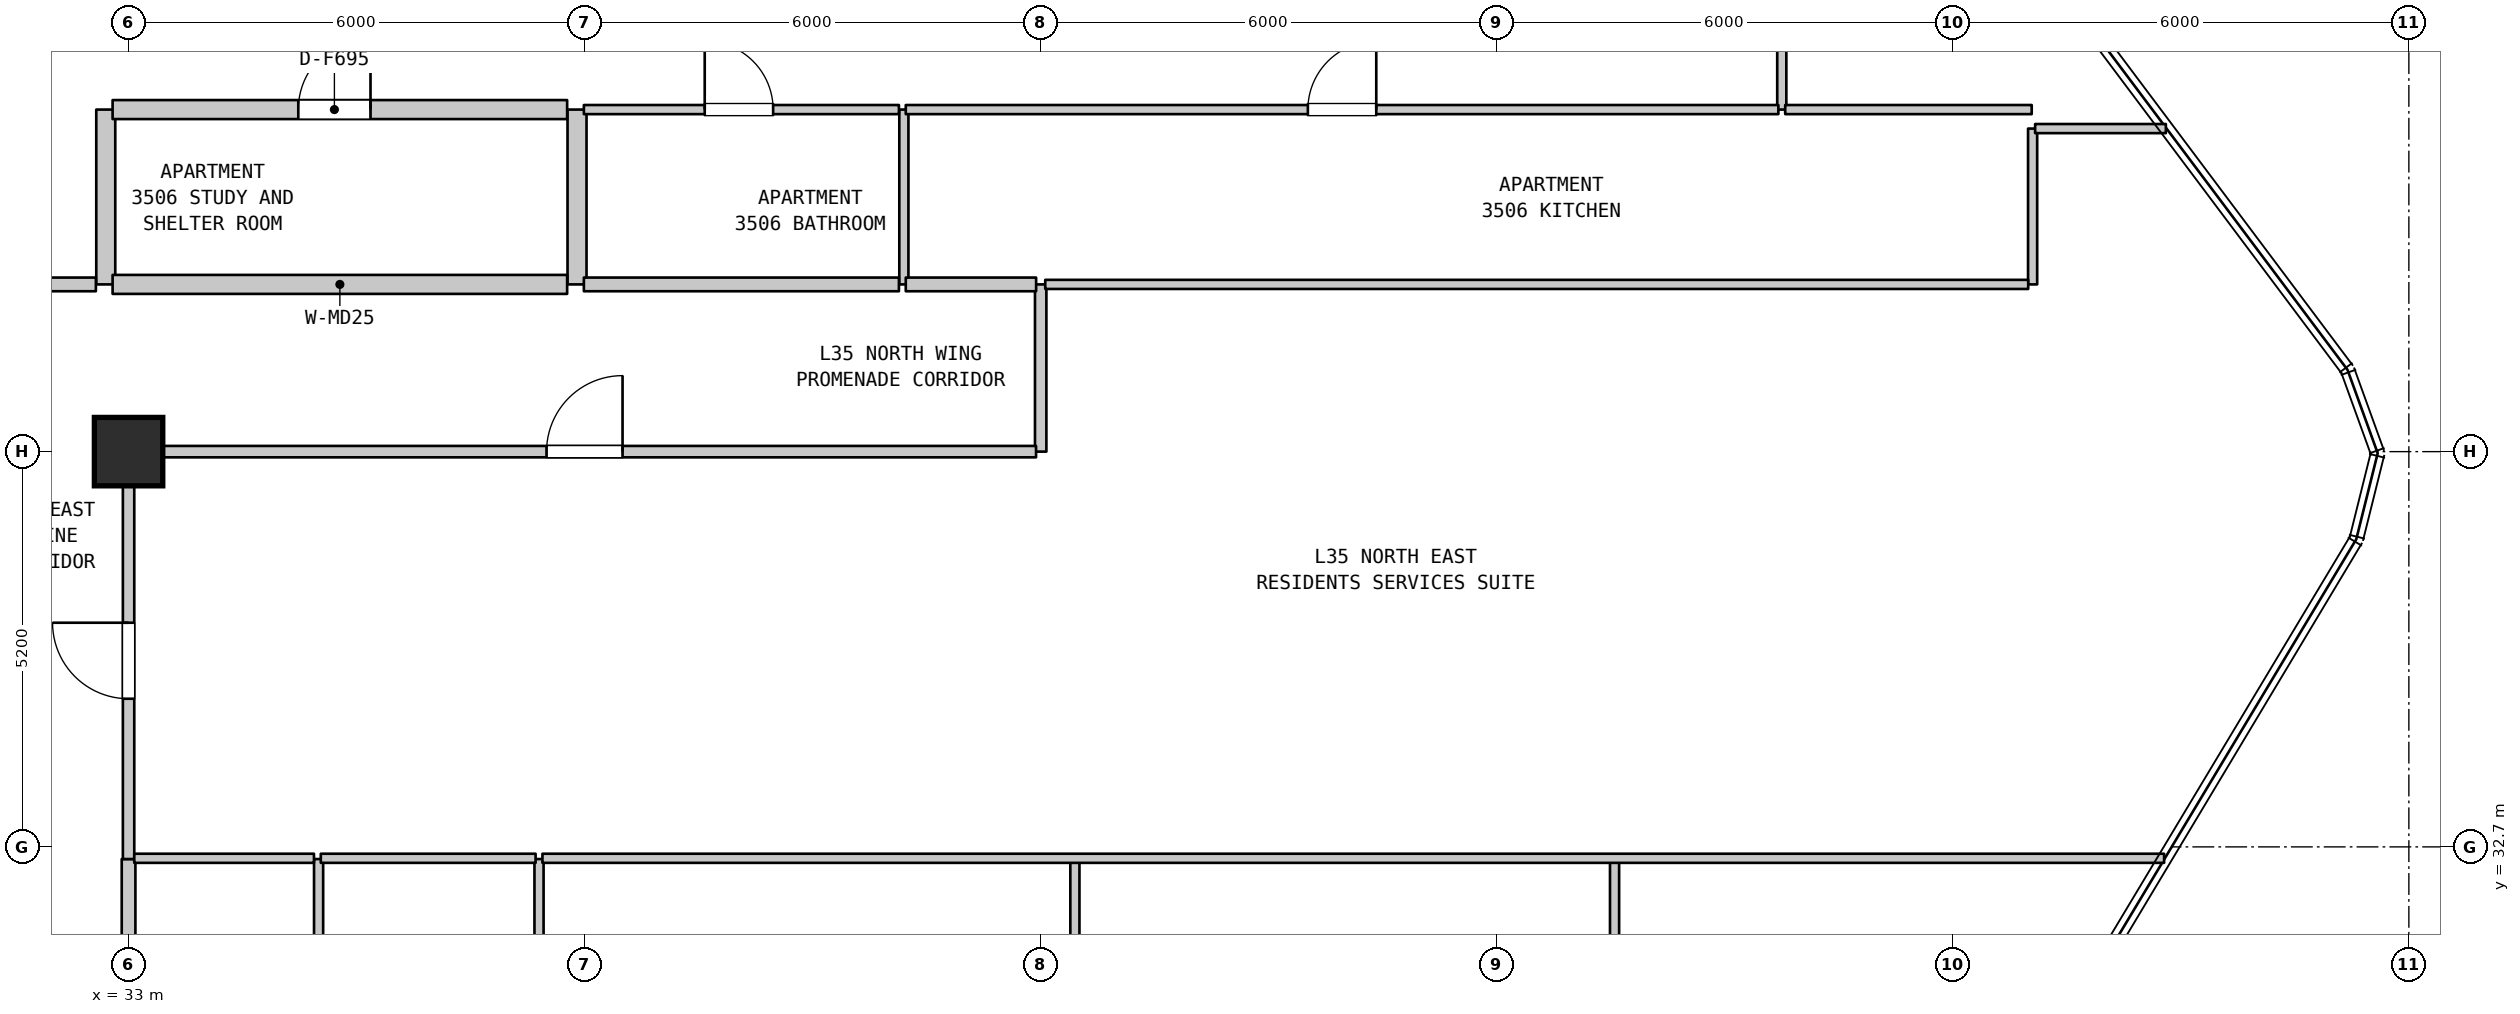
"""IFC4 building model, lengths in metres.
Left out: names, types, materials, properties, quantities, classifications, styles, units other than length and angle.
Written with IfcOpenShell. Run it as: python <this file> out.ifc"""

import sys

from ifc_helpers import new_model, si_unit, direction, frame, frame_2d, origin, origin_2d, place, context, subcontext, project, spatial, rectangle, extrude, element, fill, save


model = new_model("IFC4")
c1 = context("Model", 3, precision=1e-05, world=origin(), true_north=direction((0.0, 1.0)))
c2 = subcontext(c1, "Body", "Model", "MODEL_VIEW")
j1 = project(units=[si_unit("LENGTHUNIT", "METRE"), si_unit("PLANEANGLEUNIT", "RADIAN")], contexts=[c1])
p1 = place(None, origin())
s1 = spatial("IfcSite", under=j1, at=p1, CompositionType="ELEMENT")
p2 = place(p1, origin())
s2 = spatial("IfcBuilding", under=s1, at=p2, CompositionType="ELEMENT")
p3 = place(p2, frame((0.0, 0.0, 144.6)))
s3 = spatial("IfcBuildingStorey", under=s2, at=p3, CompositionType="ELEMENT", Elevation=144.6)
p4 = place(p3, frame((33.0, 37.9, 0.0), z_axis=(0.0, 0.0, 1.0), x_axis=(1.0, 0.0, 0.0)))
e1 = element("IfcColumn", 1, at=p4, inside=s3, PredefinedType="COLUMN", context=c2, shape_type="SweptSolid", body=[
    extrude(rectangle(XDim=0.9, YDim=0.9, at=origin_2d()), origin(), (0.0, 0.0, 1.0), 3.7),
])
p5 = place(p3, frame((32.7, 40.1, 0.0), z_axis=(0.0, 0.0, 1.0), x_axis=(0.0, 1.0, 0.0)))
e2 = element("IfcWall", 2, at=p5, inside=s3, PredefinedType="STANDARD", context=c2, shape_type="SweptSolid", body=[
    extrude(rectangle(XDim=2.3, YDim=0.25, at=frame_2d((1.15, 0.0))), origin(), (0.0, 0.0, 1.0), 3.385),
])
p6 = place(p3, frame((33.0, 27.47, 0.0), z_axis=(0.0, 0.0, 1.0), x_axis=(0.0, 1.0, 0.0)))
e3 = element("IfcWall", 3, at=p6, inside=s3, PredefinedType="STANDARD", context=c2, shape_type="SweptSolid", body=[
    extrude(rectangle(XDim=5.07, YDim=0.18, at=frame_2d((2.535, 0.0))), origin(), (0.0, 0.0, 1.0), 2.885),
])
p7 = place(p3, frame((33.0, 32.54, 0.0), z_axis=(0.0, 0.0, 1.0), x_axis=(0.0, 1.0, 0.0)))
e4 = element("IfcWall", 4, at=p7, inside=s3, PredefinedType="STANDARD", context=c2, shape_type="SweptSolid", body=[
    extrude(rectangle(XDim=5.36, YDim=0.15, at=frame_2d((2.68, 0.0))), origin(), (0.0, 0.0, 1.0), 2.885),
])
p8 = place(p7, frame((2.109, 0.0, 0.0)))
e5 = element("IfcOpeningElement", 5, at=p8, cuts=e4, PredefinedType="OPENING", context=c2, shape_type="SweptSolid", body=[
    extrude(rectangle(XDim=1.0, YDim=2.15, at=frame_2d((0.5, 1.075))), frame((0.0, 0.085, 0.0), z_axis=(0.0, -1.0, 0.0), x_axis=(1.0, 0.0, 0.0)), (0.0, 0.0, 1.0), 0.17),
])
for number, where, z_axis, x_axis in (
    (6, (35.5, 27.47, 0.0), (0.0, 0.0, 1.0), (0.0, 1.0, 0.0)),
    (7, (38.4, 27.47, 0.0), (0.0, 0.0, 1.0), (0.0, 1.0, 0.0)),
):
    element("IfcWall", number, at=place(p3, frame(where, z_axis=z_axis, x_axis=x_axis)), inside=s3, PredefinedType="PARTITIONING", context=c2, shape_type="SweptSolid", body=[
        extrude(rectangle(XDim=5.07, YDim=0.12, at=frame_2d((2.535, 0.0))), origin(), (0.0, 0.0, 1.0), 3.385),
    ])
p9 = place(p3, frame((38.9, 40.1, 0.0), z_axis=(0.0, 0.0, 1.0), x_axis=(0.0, 1.0, 0.0)))
e8 = element("IfcWall", 8, at=p9, inside=s3, PredefinedType="STANDARD", context=c2, shape_type="SweptSolid", body=[
    extrude(rectangle(XDim=2.3, YDim=0.25, at=frame_2d((1.15, 0.0))), origin(), (0.0, 0.0, 1.0), 3.385),
])
p10 = place(p3, frame((43.2, 40.1, 0.0), z_axis=(0.0, 0.0, 1.0), x_axis=(0.0, 1.0, 0.0)))
e9 = element("IfcWall", 9, at=p10, inside=s3, PredefinedType="PARTITIONING", context=c2, shape_type="SweptSolid", body=[
    extrude(rectangle(XDim=2.3, YDim=0.12, at=frame_2d((1.15, 0.0))), origin(), (0.0, 0.0, 1.0), 3.385),
])
p11 = place(p3, frame((45.0, 37.9, 0.0), z_axis=(0.0, 0.0, 1.0), x_axis=(0.0, 1.0, 0.0)))
e10 = element("IfcWall", 10, at=p11, inside=s3, PredefinedType="STANDARD", context=c2, shape_type="SweptSolid", body=[
    extrude(rectangle(XDim=2.2, YDim=0.15, at=frame_2d((1.1, 0.0))), origin(), (0.0, 0.0, 1.0), 3.385),
])
for number, where, z_axis, x_axis in (
    (11, (45.45, 27.47, 0.0), (0.0, 0.0, 1.0), (0.0, 1.0, 0.0)),
    (12, (52.55, 27.47, 0.0), (0.0, 0.0, 1.0), (0.0, 1.0, 0.0)),
):
    element("IfcWall", number, at=place(p3, frame(where, z_axis=z_axis, x_axis=x_axis)), inside=s3, PredefinedType="PARTITIONING", context=c2, shape_type="SweptSolid", body=[
        extrude(rectangle(XDim=5.07, YDim=0.12, at=frame_2d((2.535, 0.0))), origin(), (0.0, 0.0, 1.0), 3.385),
    ])
p12 = place(p3, frame((54.75, 42.4, 0.0), z_axis=(0.0, 0.0, 1.0), x_axis=(0.0, 1.0, 0.0)))
e13 = element("IfcWall", 13, at=p12, inside=s3, PredefinedType="PARTITIONING", context=c2, shape_type="SweptSolid", body=[
    extrude(rectangle(XDim=3.05, YDim=0.12, at=frame_2d((1.525, 0.0))), origin(), (0.0, 0.0, 1.0), 3.385),
])
p13 = place(p12, frame((1.003, 0.0, 0.0)))
e14 = element("IfcOpeningElement", 14, at=p13, cuts=e13, PredefinedType="OPENING", context=c2, shape_type="SweptSolid", body=[
    extrude(rectangle(XDim=0.9, YDim=2.15, at=frame_2d((0.45, 1.075))), frame((0.0, 0.07, 0.0), z_axis=(0.0, -1.0, 0.0), x_axis=(1.0, 0.0, 0.0)), (0.0, 0.0, 1.0), 0.14),
])
p14 = place(p3, frame((58.05, 40.1, 0.0), z_axis=(0.0, 0.0, 1.0), x_axis=(0.0, 1.0, 0.0)))
e15 = element("IfcWall", 15, at=p14, inside=s3, PredefinedType="PARTITIONING", context=c2, shape_type="SweptSolid", body=[
    extrude(rectangle(XDim=2.05, YDim=0.12, at=frame_2d((1.025, 0.0))), origin(), (0.0, 0.0, 1.0), 3.385),
])
p15 = place(p3, frame((33.075, 32.55, 0.0), z_axis=(0.0, 0.0, 1.0), x_axis=(1.0, 0.0, 0.0)))
e16 = element("IfcWall", 16, at=p15, inside=s3, PredefinedType="PARTITIONING", context=c2, shape_type="SweptSolid", body=[
    extrude(rectangle(XDim=2.364, YDim=0.12, at=frame_2d((1.182, 0.0))), origin(), (0.0, 0.0, 1.0), 3.385),
])
p16 = place(p3, frame((35.529, 32.55, 0.0), z_axis=(0.0, 0.0, 1.0), x_axis=(1.0, 0.0, 0.0)))
e17 = element("IfcWall", 17, at=p16, inside=s3, PredefinedType="PARTITIONING", context=c2, shape_type="SweptSolid", body=[
    extrude(rectangle(XDim=2.826, YDim=0.12, at=frame_2d((1.413, 0.0))), origin(), (0.0, 0.0, 1.0), 3.385),
])
p17 = place(p3, frame((38.445, 32.55, 0.0), z_axis=(0.0, 0.0, 1.0), x_axis=(1.0, 0.0, 0.0)))
e18 = element("IfcWall", 18, at=p17, inside=s3, PredefinedType="PARTITIONING", context=c2, shape_type="SweptSolid", body=[
    extrude(rectangle(XDim=21.335, YDim=0.12, at=frame_2d((10.667, 0.0))), origin(), (0.0, 0.0, 1.0), 3.385),
])
p18 = place(p3, frame((33.06, 37.9, 0.0), z_axis=(0.0, 0.0, 1.0), x_axis=(1.0, 0.0, 0.0)))
e19 = element("IfcWall", 19, at=p18, inside=s3, PredefinedType="STANDARD", context=c2, shape_type="SweptSolid", body=[
    extrude(rectangle(XDim=11.879, YDim=0.15, at=frame_2d((5.939, 0.0))), origin(), (0.0, 0.0, 1.0), 3.385),
])
p19 = place(p18, frame((5.439, 0.0, 0.0)))
e20 = element("IfcOpeningElement", 20, at=p19, cuts=e19, PredefinedType="OPENING", context=c2, shape_type="SweptSolid", body=[
    extrude(rectangle(XDim=1.0, YDim=2.15, at=frame_2d((0.5, 1.075))), frame((0.0, 0.085, 0.0), z_axis=(0.0, -1.0, 0.0), x_axis=(1.0, 0.0, 0.0)), (0.0, 0.0, 1.0), 0.17),
])
p20 = place(p3, frame((22.225, 40.1, 0.0), z_axis=(0.0, 0.0, 1.0), x_axis=(1.0, 0.0, 0.0)))
e21 = element("IfcWall", 21, at=p20, inside=s3, PredefinedType="STANDARD", context=c2, shape_type="SweptSolid", body=[
    extrude(rectangle(XDim=10.345, YDim=0.18, at=frame_2d((5.172, 0.0))), origin(), (0.0, 0.0, 1.0), 3.385),
])
p21 = place(p20, frame((2.305, 0.0, 0.0)))
e22 = element("IfcOpeningElement", 22, at=p21, cuts=e21, PredefinedType="OPENING", context=c2, shape_type="SweptSolid", body=[
    extrude(rectangle(XDim=1.0, YDim=2.15, at=frame_2d((0.5, 1.075))), frame((0.0, 0.1, 0.0), z_axis=(0.0, -1.0, 0.0), x_axis=(1.0, 0.0, 0.0)), (0.0, 0.0, 1.0), 0.2),
])
p22 = place(p20, frame((7.235, 0.0, 0.0)))
e23 = element("IfcOpeningElement", 23, at=p22, cuts=e21, PredefinedType="OPENING", context=c2, shape_type="SweptSolid", body=[
    extrude(rectangle(XDim=1.0, YDim=2.15, at=frame_2d((0.5, 1.075))), frame((0.0, 0.1, 0.0), z_axis=(0.0, -1.0, 0.0), x_axis=(1.0, 0.0, 0.0)), (0.0, 0.0, 1.0), 0.2),
])
p23 = place(p3, frame((32.79, 40.1, 0.0), z_axis=(0.0, 0.0, 1.0), x_axis=(1.0, 0.0, 0.0)))
e24 = element("IfcWall", 24, at=p23, inside=s3, PredefinedType="STANDARD", context=c2, shape_type="SweptSolid", body=[
    extrude(rectangle(XDim=5.98, YDim=0.25, at=frame_2d((2.99, 0.0))), origin(), (0.0, 0.0, 1.0), 3.385),
])
p24 = place(p3, frame((38.99, 40.1, 0.0), z_axis=(0.0, 0.0, 1.0), x_axis=(1.0, 0.0, 0.0)))
e25 = element("IfcWall", 25, at=p24, inside=s3, PredefinedType="STANDARD", context=c2, shape_type="SweptSolid", body=[
    extrude(rectangle(XDim=4.145, YDim=0.18, at=frame_2d((2.073, 0.0))), origin(), (0.0, 0.0, 1.0), 3.385),
])
p25 = place(p3, frame((43.225, 40.1, 0.0), z_axis=(0.0, 0.0, 1.0), x_axis=(1.0, 0.0, 0.0)))
e26 = element("IfcWall", 26, at=p25, inside=s3, PredefinedType="STANDARD", context=c2, shape_type="SweptSolid", body=[
    extrude(rectangle(XDim=1.715, YDim=0.18, at=frame_2d((0.857, 0.0))), origin(), (0.0, 0.0, 1.0), 3.385),
])
p26 = place(p3, frame((45.06, 40.1, 0.0), z_axis=(0.0, 0.0, 1.0), x_axis=(1.0, 0.0, 0.0)))
e27 = element("IfcWall", 27, at=p26, inside=s3, PredefinedType="PARTITIONING", context=c2, shape_type="SweptSolid", body=[
    extrude(rectangle(XDim=12.932, YDim=0.12, at=frame_2d((6.466, 0.0))), origin(), (0.0, 0.0, 1.0), 3.385),
])
p27 = place(p3, frame((58.083, 42.15, 0.0), z_axis=(0.0, 0.0, 1.0), x_axis=(1.0, 0.0, 0.0)))
e28 = element("IfcWall", 28, at=p27, inside=s3, PredefinedType="PARTITIONING", context=c2, shape_type="SweptSolid", body=[
    extrude(rectangle(XDim=1.72, YDim=0.12, at=frame_2d((0.86, 0.0))), origin(), (0.0, 0.0, 1.0), 3.385),
])
p28 = place(p3, frame((32.79, 42.4, 0.0), z_axis=(0.0, 0.0, 1.0), x_axis=(1.0, 0.0, 0.0)))
e29 = element("IfcWall", 29, at=p28, inside=s3, PredefinedType="STANDARD", context=c2, shape_type="SweptSolid", body=[
    extrude(rectangle(XDim=5.98, YDim=0.25, at=frame_2d((2.99, 0.0))), origin(), (0.0, 0.0, 1.0), 3.385),
])
p29 = place(p28, frame((2.443, 0.0, 0.0)))
e30 = element("IfcOpeningElement", 30, at=p29, cuts=e29, PredefinedType="OPENING", context=c2, shape_type="SweptSolid", body=[
    extrude(rectangle(XDim=0.95, YDim=2.15, at=frame_2d((0.475, 1.075))), frame((0.0, 0.135, 0.0), z_axis=(0.0, -1.0, 0.0), x_axis=(1.0, 0.0, 0.0)), (0.0, 0.0, 1.0), 0.27),
])
p30 = place(p3, frame((38.99, 42.4, 0.0), z_axis=(0.0, 0.0, 1.0), x_axis=(1.0, 0.0, 0.0)))
e31 = element("IfcWall", 31, at=p30, inside=s3, PredefinedType="PARTITIONING", context=c2, shape_type="SweptSolid", body=[
    extrude(rectangle(XDim=4.145, YDim=0.12, at=frame_2d((2.073, 0.0))), origin(), (0.0, 0.0, 1.0), 3.385),
])
p31 = place(p30, frame((1.59, 0.0, 0.0)))
e32 = element("IfcOpeningElement", 32, at=p31, cuts=e31, PredefinedType="OPENING", context=c2, shape_type="SweptSolid", body=[
    extrude(rectangle(XDim=0.9, YDim=2.1, at=frame_2d((0.45, 1.05))), frame((0.0, 0.07, 0.0), z_axis=(0.0, -1.0, 0.0), x_axis=(1.0, 0.0, 0.0)), (0.0, 0.0, 1.0), 0.14),
])
p32 = place(p3, frame((43.225, 42.4, 0.0), z_axis=(0.0, 0.0, 1.0), x_axis=(1.0, 0.0, 0.0)))
e33 = element("IfcWall", 33, at=p32, inside=s3, PredefinedType="PARTITIONING", context=c2, shape_type="SweptSolid", body=[
    extrude(rectangle(XDim=11.48, YDim=0.12, at=frame_2d((5.74, 0.0))), origin(), (0.0, 0.0, 1.0), 3.385),
])
p33 = place(p32, frame((5.29, 0.0, 0.0)))
e34 = element("IfcOpeningElement", 34, at=p33, cuts=e33, PredefinedType="OPENING", context=c2, shape_type="SweptSolid", body=[
    extrude(rectangle(XDim=0.9, YDim=2.15, at=frame_2d((0.45, 1.075))), frame((0.0, 0.07, 0.0), z_axis=(0.0, -1.0, 0.0), x_axis=(1.0, 0.0, 0.0)), (0.0, 0.0, 1.0), 0.14),
])
p34 = place(p3, frame((54.795, 42.4, 0.0), z_axis=(0.0, 0.0, 1.0), x_axis=(1.0, 0.0, 0.0)))
e35 = element("IfcWall", 35, at=p34, inside=s3, PredefinedType="PARTITIONING", context=c2, shape_type="SweptSolid", body=[
    extrude(rectangle(XDim=3.243, YDim=0.12, at=frame_2d((1.622, 0.0))), origin(), (0.0, 0.0, 1.0), 3.385),
])
p35 = place(p8, origin())
e36 = element("IfcDoor", 36, at=p35, inside=s3, OperationType="SINGLE_SWING_RIGHT", PredefinedType="DOOR", context=c2, shape_type="SweptSolid", body=[
    extrude(rectangle(XDim=1.0, YDim=2.15, at=frame_2d((0.5, 1.075))), frame((0.0, 0.025, 0.0), z_axis=(0.0, -1.0, 0.0), x_axis=(1.0, 0.0, 0.0)), (0.0, 0.0, 1.0), 0.05),
])
fill(e5, e36)
p36 = place(p19, origin())
e37 = element("IfcDoor", 37, at=p36, inside=s3, OperationType="SINGLE_SWING_RIGHT", PredefinedType="DOOR", context=c2, shape_type="SweptSolid", body=[
    extrude(rectangle(XDim=1.0, YDim=2.15, at=frame_2d((0.5, 1.075))), frame((0.0, 0.025, 0.0), z_axis=(0.0, -1.0, 0.0), x_axis=(1.0, 0.0, 0.0)), (0.0, 0.0, 1.0), 0.05),
])
fill(e20, e37)
p37 = place(p29, origin())
e38 = element("IfcDoor", 38, at=p37, inside=s3, OperationType="SINGLE_SWING_RIGHT", PredefinedType="DOOR", context=c2, shape_type="SweptSolid", body=[
    extrude(rectangle(XDim=0.95, YDim=2.15, at=frame_2d((0.475, 1.075))), frame((0.0, 0.025, 0.0), z_axis=(0.0, -1.0, 0.0), x_axis=(1.0, 0.0, 0.0)), (0.0, 0.0, 1.0), 0.05),
])
fill(e30, e38)
p38 = place(p31, origin())
e39 = element("IfcDoor", 39, at=p38, inside=s3, OperationType="SINGLE_SWING_LEFT", PredefinedType="DOOR", context=c2, shape_type="SweptSolid", body=[
    extrude(rectangle(XDim=0.9, YDim=2.1, at=frame_2d((0.45, 1.05))), frame((0.0, 0.025, 0.0), z_axis=(0.0, -1.0, 0.0), x_axis=(1.0, 0.0, 0.0)), (0.0, 0.0, 1.0), 0.05),
])
fill(e32, e39)
p39 = place(p33, origin())
e40 = element("IfcDoor", 40, at=p39, inside=s3, OperationType="SINGLE_SWING_RIGHT", PredefinedType="DOOR", context=c2, shape_type="SweptSolid", body=[
    extrude(rectangle(XDim=0.9, YDim=2.15, at=frame_2d((0.45, 1.075))), frame((0.0, 0.025, 0.0), z_axis=(0.0, -1.0, 0.0), x_axis=(1.0, 0.0, 0.0)), (0.0, 0.0, 1.0), 0.05),
])
fill(e34, e40)
save(model, sys.argv[1])
